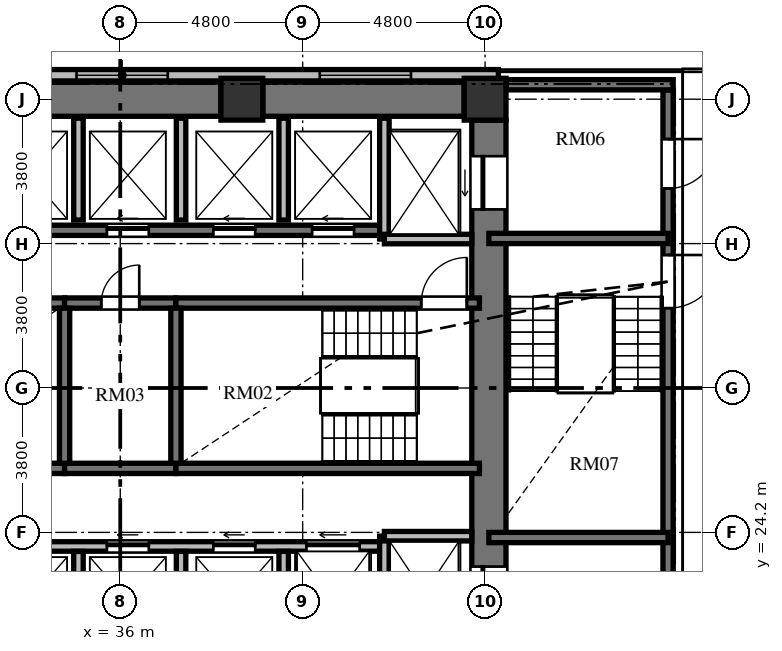
"""IFC4 building model, lengths in metres.
Left out: names, types, materials, properties, quantities, classifications, styles, units other than length and angle.
Written with IfcOpenShell. Run it as: python <this file> out.ifc"""

import sys

from ifc_helpers import new_model, si_unit, direction, frame, frame_2d, origin, origin_2d, place, context, subcontext, project, spatial, rectangle, extrude, element, fill, save


model = new_model("IFC4")
c1 = context("Model", 3, precision=1e-05, world=origin(), true_north=direction((0.0, 1.0)))
c2 = subcontext(c1, "Body", "Model", "MODEL_VIEW")
j1 = project(units=[si_unit("LENGTHUNIT", "METRE"), si_unit("PLANEANGLEUNIT", "RADIAN")], contexts=[c1])
p1 = place(None, origin())
s1 = spatial("IfcSite", under=j1, at=p1, CompositionType="ELEMENT")
p2 = place(p1, origin())
s2 = spatial("IfcBuilding", under=s1, at=p2, CompositionType="ELEMENT")
p3 = place(p2, origin())
s3 = spatial("IfcBuildingStorey", under=s2, at=p3, CompositionType="ELEMENT", Elevation=0.0)
for number, where, z_axis, x_axis in (
    (1, (45.6, 35.6, 0.0), (0.0, 0.0, 1.0), (1.0, 0.0, 0.0)),
    (2, (39.2, 35.6, 0.0), (0.0, 0.0, 1.0), (1.0, 0.0, 0.0)),
):
    element("IfcColumn", number, at=place(p3, frame(where, z_axis=z_axis, x_axis=x_axis)), inside=s3, PredefinedType="COLUMN", context=c2, shape_type="SweptSolid", body=[
        extrude(rectangle(XDim=1.1, YDim=1.1, at=origin_2d()), origin(), (0.0, 0.0, 1.0), 6.0),
    ])
p4 = place(p3, frame((45.7, 20.95, 0.0), z_axis=(0.0, 0.0, 1.0), x_axis=(0.0, 1.0, 0.0)))
e3 = element("IfcWall", 3, at=p4, inside=s3, PredefinedType="SHEAR", context=c2, shape_type="SweptSolid", body=[
    extrude(rectangle(XDim=14.1, YDim=0.9, at=frame_2d((7.05, 0.0))), origin(), (0.0, 0.0, 1.0), 6.0),
])
p5 = place(p4, frame((11.75, 0.0, 0.0)))
e4 = element("IfcOpeningElement", 4, at=p5, cuts=e3, PredefinedType="OPENING", context=c2, shape_type="SweptSolid", body=[
    extrude(rectangle(XDim=1.4, YDim=2.3, at=frame_2d((0.7, 1.15))), frame((0.0, 0.46, 0.0), z_axis=(0.0, -1.0, 0.0), x_axis=(1.0, 0.0, 0.0)), (0.0, 0.0, 1.0), 0.92),
])
p6 = place(p4, frame((0.95, 0.0, 0.0)))
e5 = element("IfcOpeningElement", 5, at=p6, cuts=e3, PredefinedType="OPENING", context=c2, shape_type="SweptSolid", body=[
    extrude(rectangle(XDim=1.4, YDim=2.3, at=frame_2d((0.7, 1.15))), frame((0.0, 0.46, 0.0), z_axis=(0.0, -1.0, 0.0), x_axis=(1.0, 0.0, 0.0)), (0.0, 0.0, 1.0), 0.92),
])
p7 = place(p3, frame((33.35, 35.6, 0.0), z_axis=(0.0, 0.0, 1.0), x_axis=(1.0, 0.0, 0.0)))
e6 = element("IfcWall", 6, at=p7, inside=s3, PredefinedType="SHEAR", context=c2, shape_type="SweptSolid", body=[
    extrude(rectangle(XDim=5.3, YDim=0.9, at=frame_2d((2.65, 0.0))), origin(), (0.0, 0.0, 1.0), 6.0),
])
p8 = place(p3, frame((39.75, 35.6, 0.0), z_axis=(0.0, 0.0, 1.0), x_axis=(1.0, 0.0, 0.0)))
e7 = element("IfcWall", 7, at=p8, inside=s3, PredefinedType="SHEAR", context=c2, shape_type="SweptSolid", body=[
    extrude(rectangle(XDim=5.3, YDim=0.9, at=frame_2d((2.65, 0.0))), origin(), (0.0, 0.0, 1.0), 6.0),
])
p9 = place(p3, frame((24.0, 36.23, 0.0), z_axis=(0.0, 0.0, 1.0), x_axis=(1.0, 0.0, 0.0)))
e8 = element("IfcWall", 8, at=p9, inside=s3, PredefinedType="SOLIDWALL", context=c2, shape_type="SweptSolid", body=[
    extrude(rectangle(XDim=21.95, YDim=0.3, at=frame_2d((10.975, 0.0))), origin(), (0.0, 0.0, 1.0), 5.72),
])
p10 = place(p9, frame((4.45, 0.0, 0.9)))
e9 = element("IfcOpeningElement", 9, at=p10, cuts=e8, PredefinedType="OPENING", context=c2, shape_type="SweptSolid", body=[
    extrude(rectangle(XDim=2.4, YDim=3.0, at=frame_2d((1.2, 1.5))), frame((0.0, 0.16, 0.0), z_axis=(0.0, -1.0, 0.0), x_axis=(1.0, 0.0, 0.0)), (0.0, 0.0, 1.0), 0.32),
])
p11 = place(p9, frame((10.85, 0.0, 0.9)))
e10 = element("IfcOpeningElement", 10, at=p11, cuts=e8, PredefinedType="OPENING", context=c2, shape_type="SweptSolid", body=[
    extrude(rectangle(XDim=2.4, YDim=3.0, at=frame_2d((1.2, 1.5))), frame((0.0, 0.16, 0.0), z_axis=(0.0, -1.0, 0.0), x_axis=(1.0, 0.0, 0.0)), (0.0, 0.0, 1.0), 0.32),
])
p12 = place(p9, frame((17.25, 0.0, 0.9)))
e11 = element("IfcOpeningElement", 11, at=p12, cuts=e8, PredefinedType="OPENING", context=c2, shape_type="SweptSolid", body=[
    extrude(rectangle(XDim=2.4, YDim=3.0, at=frame_2d((1.2, 1.5))), frame((0.0, 0.16, 0.0), z_axis=(0.0, -1.0, 0.0), x_axis=(1.0, 0.0, 0.0)), (0.0, 0.0, 1.0), 0.32),
])
p13 = place(p3, frame((26.55, 30.235, 0.0), z_axis=(0.0, 0.0, 1.0), x_axis=(1.0, 0.0, 0.0)))
e12 = element("IfcWall", 12, at=p13, inside=s3, PredefinedType="SHEAR", context=c2, shape_type="SweptSolid", body=[
    extrude(rectangle(XDim=7.985, YDim=0.27, at=frame_2d((3.992, 0.0))), origin(), (0.0, 0.0, 1.0), 6.0),
])
p14 = place(p3, frame((34.535, 30.235, 0.0), z_axis=(0.0, 0.0, 1.0), x_axis=(1.0, 0.0, 0.0)))
e13 = element("IfcWall", 13, at=p14, inside=s3, PredefinedType="SHEAR", context=c2, shape_type="SweptSolid", body=[
    extrude(rectangle(XDim=2.93, YDim=0.27, at=frame_2d((1.465, 0.0))), origin(), (0.0, 0.0, 1.0), 6.0),
])
p15 = place(p14, frame((0.965, 0.0, 0.0)))
e14 = element("IfcOpeningElement", 14, at=p15, cuts=e13, PredefinedType="OPENING", context=c2, shape_type="SweptSolid", body=[
    extrude(rectangle(XDim=1.0, YDim=2.1, at=frame_2d((0.5, 1.05))), frame((0.0, 0.145, 0.0), z_axis=(0.0, -1.0, 0.0), x_axis=(1.0, 0.0, 0.0)), (0.0, 0.0, 1.0), 0.29),
])
p16 = place(p3, frame((37.465, 30.235, 0.0), z_axis=(0.0, 0.0, 1.0), x_axis=(1.0, 0.0, 0.0)))
e15 = element("IfcWall", 15, at=p16, inside=s3, PredefinedType="SHEAR", context=c2, shape_type="SweptSolid", body=[
    extrude(rectangle(XDim=7.985, YDim=0.27, at=frame_2d((3.992, 0.0))), origin(), (0.0, 0.0, 1.0), 6.0),
])
p17 = place(p16, frame((6.455, 0.0, 0.0)))
e16 = element("IfcOpeningElement", 16, at=p17, cuts=e15, PredefinedType="OPENING", context=c2, shape_type="SweptSolid", body=[
    extrude(rectangle(XDim=1.2, YDim=2.15, at=frame_2d((0.6, 1.075))), frame((0.0, 0.145, 0.0), z_axis=(0.0, -1.0, 0.0), x_axis=(1.0, 0.0, 0.0)), (0.0, 0.0, 1.0), 0.29),
])
p18 = place(p3, frame((26.55, 25.885, 0.0), z_axis=(0.0, 0.0, 1.0), x_axis=(1.0, 0.0, 0.0)))
e17 = element("IfcWall", 17, at=p18, inside=s3, PredefinedType="SHEAR", context=c2, shape_type="SweptSolid", body=[
    extrude(rectangle(XDim=7.985, YDim=0.27, at=frame_2d((3.992, 0.0))), origin(), (0.0, 0.0, 1.0), 6.0),
])
p19 = place(p3, frame((34.535, 25.885, 0.0), z_axis=(0.0, 0.0, 1.0), x_axis=(1.0, 0.0, 0.0)))
e18 = element("IfcWall", 18, at=p19, inside=s3, PredefinedType="SHEAR", context=c2, shape_type="SweptSolid", body=[
    extrude(rectangle(XDim=2.93, YDim=0.27, at=frame_2d((1.465, 0.0))), origin(), (0.0, 0.0, 1.0), 6.0),
])
p20 = place(p3, frame((37.465, 25.885, 0.0), z_axis=(0.0, 0.0, 1.0), x_axis=(1.0, 0.0, 0.0)))
e19 = element("IfcWall", 19, at=p20, inside=s3, PredefinedType="SHEAR", context=c2, shape_type="SweptSolid", body=[
    extrude(rectangle(XDim=7.985, YDim=0.27, at=frame_2d((3.992, 0.0))), origin(), (0.0, 0.0, 1.0), 6.0),
])
for number, where, z_axis, x_axis in (
    (20, (34.535, 26.02, 0.0), (0.0, 0.0, 1.0), (0.0, 1.0, 0.0)),
    (21, (37.465, 26.02, 0.0), (0.0, 0.0, 1.0), (0.0, 1.0, 0.0)),
):
    element("IfcWall", number, at=place(p3, frame(where, z_axis=z_axis, x_axis=x_axis)), inside=s3, PredefinedType="SHEAR", context=c2, shape_type="SweptSolid", body=[
        extrude(rectangle(XDim=4.08, YDim=0.27, at=frame_2d((2.04, 0.0))), origin(), (0.0, 0.0, 1.0), 6.0),
    ])
p21 = place(p3, frame((26.55, 32.15, 0.0), z_axis=(0.0, 0.0, 1.0), x_axis=(1.0, 0.0, 0.0)))
e22 = element("IfcWall", 22, at=p21, inside=s3, PredefinedType="SHEAR", context=c2, shape_type="SweptSolid", body=[
    extrude(rectangle(XDim=16.4, YDim=0.27, at=frame_2d((8.2, 0.0))), origin(), (0.0, 0.0, 1.0), 6.0),
])
p22 = place(p21, frame((1.1, 0.0, 0.0)))
e23 = element("IfcOpeningElement", 23, at=p22, cuts=e22, PredefinedType="OPENING", context=c2, shape_type="SweptSolid", body=[
    extrude(rectangle(XDim=1.1, YDim=2.2, at=frame_2d((0.55, 1.1))), frame((0.0, 0.145, 0.0), z_axis=(0.0, -1.0, 0.0), x_axis=(1.0, 0.0, 0.0)), (0.0, 0.0, 1.0), 0.29),
])
p23 = place(p21, frame((3.7, 0.0, 0.0)))
e24 = element("IfcOpeningElement", 24, at=p23, cuts=e22, PredefinedType="OPENING", context=c2, shape_type="SweptSolid", body=[
    extrude(rectangle(XDim=1.1, YDim=2.2, at=frame_2d((0.55, 1.1))), frame((0.0, 0.145, 0.0), z_axis=(0.0, -1.0, 0.0), x_axis=(1.0, 0.0, 0.0)), (0.0, 0.0, 1.0), 0.29),
])
p24 = place(p21, frame((6.5, 0.0, 0.0)))
e25 = element("IfcOpeningElement", 25, at=p24, cuts=e22, PredefinedType="OPENING", context=c2, shape_type="SweptSolid", body=[
    extrude(rectangle(XDim=1.1, YDim=2.2, at=frame_2d((0.55, 1.1))), frame((0.0, 0.145, 0.0), z_axis=(0.0, -1.0, 0.0), x_axis=(1.0, 0.0, 0.0)), (0.0, 0.0, 1.0), 0.29),
])
p25 = place(p21, frame((9.1, 0.0, 0.0)))
e26 = element("IfcOpeningElement", 26, at=p25, cuts=e22, PredefinedType="OPENING", context=c2, shape_type="SweptSolid", body=[
    extrude(rectangle(XDim=1.1, YDim=2.2, at=frame_2d((0.55, 1.1))), frame((0.0, 0.145, 0.0), z_axis=(0.0, -1.0, 0.0), x_axis=(1.0, 0.0, 0.0)), (0.0, 0.0, 1.0), 0.29),
])
p26 = place(p21, frame((11.9, 0.0, 0.0)))
e27 = element("IfcOpeningElement", 27, at=p26, cuts=e22, PredefinedType="OPENING", context=c2, shape_type="SweptSolid", body=[
    extrude(rectangle(XDim=1.1, YDim=2.2, at=frame_2d((0.55, 1.1))), frame((0.0, 0.145, 0.0), z_axis=(0.0, -1.0, 0.0), x_axis=(1.0, 0.0, 0.0)), (0.0, 0.0, 1.0), 0.29),
])
p27 = place(p21, frame((14.5, 0.0, 0.0)))
e28 = element("IfcOpeningElement", 28, at=p27, cuts=e22, PredefinedType="OPENING", context=c2, shape_type="SweptSolid", body=[
    extrude(rectangle(XDim=1.1, YDim=2.2, at=frame_2d((0.55, 1.1))), frame((0.0, 0.145, 0.0), z_axis=(0.0, -1.0, 0.0), x_axis=(1.0, 0.0, 0.0)), (0.0, 0.0, 1.0), 0.29),
])
p28 = place(p3, frame((26.75, 23.83, 0.0), z_axis=(0.0, 0.0, 1.0), x_axis=(1.0, 0.0, 0.0)))
e29 = element("IfcWall", 29, at=p28, inside=s3, PredefinedType="SOLIDWALL", context=c2, shape_type="SweptSolid", body=[
    extrude(rectangle(XDim=16.2, YDim=0.25, at=frame_2d((8.1, 0.0))), origin(), (0.0, 0.0, 1.0), 5.72),
])
p29 = place(p28, frame((0.9, 0.0, 0.0)))
e30 = element("IfcOpeningElement", 30, at=p29, cuts=e29, PredefinedType="OPENING", context=c2, shape_type="SweptSolid", body=[
    extrude(rectangle(XDim=1.1, YDim=2.2, at=frame_2d((0.55, 1.1))), frame((0.0, 0.135, 0.0), z_axis=(0.0, -1.0, 0.0), x_axis=(1.0, 0.0, 0.0)), (0.0, 0.0, 1.0), 0.27),
])
p30 = place(p28, frame((3.5, 0.0, 0.0)))
e31 = element("IfcOpeningElement", 31, at=p30, cuts=e29, PredefinedType="OPENING", context=c2, shape_type="SweptSolid", body=[
    extrude(rectangle(XDim=1.1, YDim=2.2, at=frame_2d((0.55, 1.1))), frame((0.0, 0.135, 0.0), z_axis=(0.0, -1.0, 0.0), x_axis=(1.0, 0.0, 0.0)), (0.0, 0.0, 1.0), 0.27),
])
p31 = place(p28, frame((6.3, 0.0, 0.0)))
e32 = element("IfcOpeningElement", 32, at=p31, cuts=e29, PredefinedType="OPENING", context=c2, shape_type="SweptSolid", body=[
    extrude(rectangle(XDim=1.1, YDim=2.2, at=frame_2d((0.55, 1.1))), frame((0.0, 0.135, 0.0), z_axis=(0.0, -1.0, 0.0), x_axis=(1.0, 0.0, 0.0)), (0.0, 0.0, 1.0), 0.27),
])
p32 = place(p28, frame((8.9, 0.0, 0.0)))
e33 = element("IfcOpeningElement", 33, at=p32, cuts=e29, PredefinedType="OPENING", context=c2, shape_type="SweptSolid", body=[
    extrude(rectangle(XDim=1.1, YDim=2.2, at=frame_2d((0.55, 1.1))), frame((0.0, 0.135, 0.0), z_axis=(0.0, -1.0, 0.0), x_axis=(1.0, 0.0, 0.0)), (0.0, 0.0, 1.0), 0.27),
])
p33 = place(p28, frame((11.7, 0.0, 0.0)))
e34 = element("IfcOpeningElement", 34, at=p33, cuts=e29, PredefinedType="OPENING", context=c2, shape_type="SweptSolid", body=[
    extrude(rectangle(XDim=1.1, YDim=2.2, at=frame_2d((0.55, 1.1))), frame((0.0, 0.135, 0.0), z_axis=(0.0, -1.0, 0.0), x_axis=(1.0, 0.0, 0.0)), (0.0, 0.0, 1.0), 0.27),
])
p34 = place(p28, frame((14.15, 0.0, 0.0)))
e35 = element("IfcOpeningElement", 35, at=p34, cuts=e29, PredefinedType="OPENING", context=c2, shape_type="SweptSolid", body=[
    extrude(rectangle(XDim=1.4, YDim=2.3, at=frame_2d((0.7, 1.15))), frame((0.0, 0.135, 0.0), z_axis=(0.0, -1.0, 0.0), x_axis=(1.0, 0.0, 0.0)), (0.0, 0.0, 1.0), 0.27),
])
p35 = place(p3, frame((42.95, 31.92, 0.0), z_axis=(0.0, 0.0, 1.0), x_axis=(0.0, 1.0, 0.0)))
e36 = element("IfcWall", 36, at=p35, inside=s3, PredefinedType="SOLIDWALL", context=c2, shape_type="SweptSolid", body=[
    extrude(rectangle(XDim=3.18, YDim=0.25, at=frame_2d((1.59, 0.0))), origin(), (0.0, 0.0, 1.0), 5.72),
])
p36 = place(p3, frame((42.95, 31.92, 0.0), z_axis=(0.0, 0.0, 1.0), x_axis=(1.0, 0.0, 0.0)))
e37 = element("IfcWall", 37, at=p36, inside=s3, PredefinedType="SOLIDWALL", context=c2, shape_type="SweptSolid", body=[
    extrude(rectangle(XDim=2.3, YDim=0.25, at=frame_2d((1.15, 0.0))), origin(), (0.0, 0.0, 1.0), 5.72),
])
p37 = place(p3, frame((42.95, 20.9, 0.0), z_axis=(0.0, 0.0, 1.0), x_axis=(0.0, 1.0, 0.0)))
e38 = element("IfcWall", 38, at=p37, inside=s3, PredefinedType="SOLIDWALL", context=c2, shape_type="SweptSolid", body=[
    extrude(rectangle(XDim=3.2, YDim=0.25, at=frame_2d((1.6, 0.0))), origin(), (0.0, 0.0, 1.0), 5.72),
])
p38 = place(p3, frame((42.95, 24.1, 0.0), z_axis=(0.0, 0.0, 1.0), x_axis=(1.0, 0.0, 0.0)))
e39 = element("IfcWall", 39, at=p38, inside=s3, PredefinedType="SOLIDWALL", context=c2, shape_type="SweptSolid", body=[
    extrude(rectangle(XDim=2.3, YDim=0.25, at=frame_2d((1.15, 0.0))), origin(), (0.0, 0.0, 1.0), 5.72),
])
p39 = place(p3, frame((34.9, 32.42, 0.0), z_axis=(0.0, 0.0, 1.0), x_axis=(0.0, 1.0, 0.0)))
e40 = element("IfcWall", 40, at=p39, inside=s3, PredefinedType="SOLIDWALL", context=c2, shape_type="SweptSolid", body=[
    extrude(rectangle(XDim=2.68, YDim=0.25, at=frame_2d((1.34, 0.0))), origin(), (0.0, 0.0, 1.0), 5.72),
])
p40 = place(p3, frame((34.9, 20.9, 0.0), z_axis=(0.0, 0.0, 1.0), x_axis=(0.0, 1.0, 0.0)))
e41 = element("IfcWall", 41, at=p40, inside=s3, PredefinedType="SOLIDWALL", context=c2, shape_type="SweptSolid", body=[
    extrude(rectangle(XDim=2.8, YDim=0.25, at=frame_2d((1.4, 0.0))), origin(), (0.0, 0.0, 1.0), 5.72),
])
p41 = place(p3, frame((37.6, 32.42, 0.0), z_axis=(0.0, 0.0, 1.0), x_axis=(0.0, 1.0, 0.0)))
e42 = element("IfcWall", 42, at=p41, inside=s3, PredefinedType="SOLIDWALL", context=c2, shape_type="SweptSolid", body=[
    extrude(rectangle(XDim=2.68, YDim=0.25, at=frame_2d((1.34, 0.0))), origin(), (0.0, 0.0, 1.0), 5.72),
])
p42 = place(p3, frame((37.6, 20.9, 0.0), z_axis=(0.0, 0.0, 1.0), x_axis=(0.0, 1.0, 0.0)))
e43 = element("IfcWall", 43, at=p42, inside=s3, PredefinedType="SOLIDWALL", context=c2, shape_type="SweptSolid", body=[
    extrude(rectangle(XDim=2.8, YDim=0.25, at=frame_2d((1.4, 0.0))), origin(), (0.0, 0.0, 1.0), 5.72),
])
p43 = place(p3, frame((40.3, 32.42, 0.0), z_axis=(0.0, 0.0, 1.0), x_axis=(0.0, 1.0, 0.0)))
e44 = element("IfcWall", 44, at=p43, inside=s3, PredefinedType="SOLIDWALL", context=c2, shape_type="SweptSolid", body=[
    extrude(rectangle(XDim=2.68, YDim=0.25, at=frame_2d((1.34, 0.0))), origin(), (0.0, 0.0, 1.0), 5.72),
])
p44 = place(p3, frame((40.3, 20.9, 0.0), z_axis=(0.0, 0.0, 1.0), x_axis=(0.0, 1.0, 0.0)))
e45 = element("IfcWall", 45, at=p44, inside=s3, PredefinedType="SOLIDWALL", context=c2, shape_type="SweptSolid", body=[
    extrude(rectangle(XDim=2.8, YDim=0.25, at=frame_2d((1.4, 0.0))), origin(), (0.0, 0.0, 1.0), 5.72),
])
p45 = place(p3, frame((50.415, 35.845, 0.0), z_axis=(0.0, 0.0, 1.0), x_axis=(0.0, -1.0, 0.0)))
e46 = element("IfcWall", 46, at=p45, inside=s3, PredefinedType="SHEAR", context=c2, shape_type="SweptSolid", body=[
    extrude(rectangle(XDim=15.825, YDim=0.27, at=frame_2d((7.913, 0.0))), origin(), (0.0, 0.0, 1.0), 6.0),
])
p46 = place(p45, frame((4.345, 0.0, 0.0)))
e47 = element("IfcOpeningElement", 47, at=p46, cuts=e46, PredefinedType="OPENING", context=c2, shape_type="SweptSolid", body=[
    extrude(rectangle(XDim=1.4, YDim=2.25, at=frame_2d((0.7, 1.125))), frame((0.0, 0.145, 0.0), z_axis=(0.0, -1.0, 0.0), x_axis=(1.0, 0.0, 0.0)), (0.0, 0.0, 1.0), 0.29),
])
p47 = place(p45, frame((1.295, 0.0, 0.0)))
e48 = element("IfcOpeningElement", 48, at=p47, cuts=e46, PredefinedType="OPENING", context=c2, shape_type="SweptSolid", body=[
    extrude(rectangle(XDim=1.3, YDim=2.2, at=frame_2d((0.65, 1.1))), frame((0.0, 0.145, 0.0), z_axis=(0.0, -1.0, 0.0), x_axis=(1.0, 0.0, 0.0)), (0.0, 0.0, 1.0), 0.29),
])
p48 = place(p45, frame((13.095, 0.0, 0.0)))
e49 = element("IfcOpeningElement", 49, at=p48, cuts=e46, PredefinedType="OPENING", context=c2, shape_type="SweptSolid", body=[
    extrude(rectangle(XDim=1.3, YDim=2.2, at=frame_2d((0.65, 1.1))), frame((0.0, 0.145, 0.0), z_axis=(0.0, -1.0, 0.0), x_axis=(1.0, 0.0, 0.0)), (0.0, 0.0, 1.0), 0.29),
])
p49 = place(p3, frame((46.15, 35.98, 0.0), z_axis=(0.0, 0.0, 1.0), x_axis=(1.0, 0.0, 0.0)))
e50 = element("IfcWall", 50, at=p49, inside=s3, PredefinedType="SHEAR", context=c2, shape_type="SweptSolid", body=[
    extrude(rectangle(XDim=4.4, YDim=0.27, at=frame_2d((2.2, 0.0))), origin(), (0.0, 0.0, 1.0), 6.0),
])
for number, where, z_axis, x_axis in (
    (51, (45.7, 31.935, 0.0), (0.0, 0.0, 1.0), (1.0, 0.0, 0.0)),
    (52, (45.7, 24.065, 0.0), (0.0, 0.0, 1.0), (1.0, 0.0, 0.0)),
):
    element("IfcWall", number, at=place(p3, frame(where, z_axis=z_axis, x_axis=x_axis)), inside=s3, PredefinedType="SHEAR", context=c2, shape_type="SweptSolid", body=[
        extrude(rectangle(XDim=4.715, YDim=0.27, at=frame_2d((2.357, 0.0))), origin(), (0.0, 0.0, 1.0), 6.0),
    ])
p50 = place(p11, origin())
e53 = element("IfcWindow", 53, at=p50, inside=s3, PartitioningType="SINGLE_PANEL", PredefinedType="WINDOW", context=c2, shape_type="SweptSolid", body=[
    extrude(rectangle(XDim=2.4, YDim=3.0, at=frame_2d((1.2, 1.5))), frame((0.0, 0.03, 0.0), z_axis=(0.0, -1.0, 0.0), x_axis=(1.0, 0.0, 0.0)), (0.0, 0.0, 1.0), 0.06),
])
fill(e10, e53)
p51 = place(p12, origin())
e54 = element("IfcWindow", 54, at=p51, inside=s3, PartitioningType="SINGLE_PANEL", PredefinedType="WINDOW", context=c2, shape_type="SweptSolid", body=[
    extrude(rectangle(XDim=2.4, YDim=3.0, at=frame_2d((1.2, 1.5))), frame((0.0, 0.03, 0.0), z_axis=(0.0, -1.0, 0.0), x_axis=(1.0, 0.0, 0.0)), (0.0, 0.0, 1.0), 0.06),
])
fill(e11, e54)
p52 = place(p17, origin())
e55 = element("IfcDoor", 55, at=p52, inside=s3, OperationType="SINGLE_SWING_RIGHT", PredefinedType="DOOR", context=c2, shape_type="SweptSolid", body=[
    extrude(rectangle(XDim=1.2, YDim=2.15, at=frame_2d((0.6, 1.075))), frame((0.0, 0.025, 0.0), z_axis=(0.0, -1.0, 0.0), x_axis=(1.0, 0.0, 0.0)), (0.0, 0.0, 1.0), 0.05),
])
fill(e16, e55)
p53 = place(p15, origin())
e56 = element("IfcDoor", 56, at=p53, inside=s3, OperationType="SINGLE_SWING_RIGHT", PredefinedType="DOOR", context=c2, shape_type="SweptSolid", body=[
    extrude(rectangle(XDim=1.0, YDim=2.1, at=frame_2d((0.5, 1.05))), frame((0.0, 0.025, 0.0), z_axis=(0.0, -1.0, 0.0), x_axis=(1.0, 0.0, 0.0)), (0.0, 0.0, 1.0), 0.05),
])
fill(e14, e56)
p54 = place(p25, origin())
e57 = element("IfcDoor", 57, at=p54, inside=s3, OperationType="SLIDING_TO_LEFT", PredefinedType="DOOR", context=c2, shape_type="SweptSolid", body=[
    extrude(rectangle(XDim=1.1, YDim=2.2, at=frame_2d((0.55, 1.1))), frame((0.0, 0.025, 0.0), z_axis=(0.0, -1.0, 0.0), x_axis=(1.0, 0.0, 0.0)), (0.0, 0.0, 1.0), 0.05),
])
fill(e26, e57)
p55 = place(p32, origin())
e58 = element("IfcDoor", 58, at=p55, inside=s3, OperationType="SLIDING_TO_LEFT", PredefinedType="DOOR", context=c2, shape_type="SweptSolid", body=[
    extrude(rectangle(XDim=1.1, YDim=2.2, at=frame_2d((0.55, 1.1))), frame((0.0, 0.025, 0.0), z_axis=(0.0, -1.0, 0.0), x_axis=(1.0, 0.0, 0.0)), (0.0, 0.0, 1.0), 0.05),
])
fill(e33, e58)
p56 = place(p26, origin())
e59 = element("IfcDoor", 59, at=p56, inside=s3, OperationType="SLIDING_TO_LEFT", PredefinedType="DOOR", context=c2, shape_type="SweptSolid", body=[
    extrude(rectangle(XDim=1.1, YDim=2.2, at=frame_2d((0.55, 1.1))), frame((0.0, 0.025, 0.0), z_axis=(0.0, -1.0, 0.0), x_axis=(1.0, 0.0, 0.0)), (0.0, 0.0, 1.0), 0.05),
])
fill(e27, e59)
p57 = place(p27, origin())
e60 = element("IfcDoor", 60, at=p57, inside=s3, OperationType="SLIDING_TO_LEFT", PredefinedType="DOOR", context=c2, shape_type="SweptSolid", body=[
    extrude(rectangle(XDim=1.1, YDim=2.2, at=frame_2d((0.55, 1.1))), frame((0.0, 0.025, 0.0), z_axis=(0.0, -1.0, 0.0), x_axis=(1.0, 0.0, 0.0)), (0.0, 0.0, 1.0), 0.05),
])
fill(e28, e60)
p58 = place(p33, origin())
e61 = element("IfcDoor", 61, at=p58, inside=s3, OperationType="SLIDING_TO_LEFT", PredefinedType="DOOR", context=c2, shape_type="SweptSolid", body=[
    extrude(rectangle(XDim=1.1, YDim=2.2, at=frame_2d((0.55, 1.1))), frame((0.0, 0.025, 0.0), z_axis=(0.0, -1.0, 0.0), x_axis=(1.0, 0.0, 0.0)), (0.0, 0.0, 1.0), 0.05),
])
fill(e34, e61)
p59 = place(p5, origin())
e62 = element("IfcDoor", 62, at=p59, inside=s3, OperationType="SLIDING_TO_LEFT", PredefinedType="DOOR", context=c2, shape_type="SweptSolid", body=[
    extrude(rectangle(XDim=1.4, YDim=2.3, at=frame_2d((0.7, 1.15))), frame((0.0, 0.025, 0.0), z_axis=(0.0, -1.0, 0.0), x_axis=(1.0, 0.0, 0.0)), (0.0, 0.0, 1.0), 0.05),
])
fill(e4, e62)
p60 = place(p6, origin())
e63 = element("IfcDoor", 63, at=p60, inside=s3, OperationType="SLIDING_TO_LEFT", PredefinedType="DOOR", context=c2, shape_type="SweptSolid", body=[
    extrude(rectangle(XDim=1.4, YDim=2.3, at=frame_2d((0.7, 1.15))), frame((0.0, 0.025, 0.0), z_axis=(0.0, -1.0, 0.0), x_axis=(1.0, 0.0, 0.0)), (0.0, 0.0, 1.0), 0.05),
])
fill(e5, e63)
p61 = place(p34, origin())
e64 = element("IfcDoor", 64, at=p61, inside=s3, OperationType="SLIDING_TO_LEFT", PredefinedType="DOOR", context=c2, shape_type="SweptSolid", body=[
    extrude(rectangle(XDim=1.4, YDim=2.3, at=frame_2d((0.7, 1.15))), frame((0.0, 0.025, 0.0), z_axis=(0.0, -1.0, 0.0), x_axis=(1.0, 0.0, 0.0)), (0.0, 0.0, 1.0), 0.05),
])
fill(e35, e64)
p62 = place(p46, origin())
e65 = element("IfcDoor", 65, at=p62, inside=s3, OperationType="SINGLE_SWING_LEFT", PredefinedType="DOOR", context=c2, shape_type="SweptSolid", body=[
    extrude(rectangle(XDim=1.4, YDim=2.25, at=frame_2d((0.7, 1.125))), frame((0.0, 0.025, 0.0), z_axis=(0.0, -1.0, 0.0), x_axis=(1.0, 0.0, 0.0)), (0.0, 0.0, 1.0), 0.05),
])
fill(e47, e65)
p63 = place(p47, origin())
e66 = element("IfcDoor", 66, at=p63, inside=s3, OperationType="SINGLE_SWING_LEFT", PredefinedType="DOOR", context=c2, shape_type="SweptSolid", body=[
    extrude(rectangle(XDim=1.3, YDim=2.2, at=frame_2d((0.65, 1.1))), frame((0.0, 0.025, 0.0), z_axis=(0.0, -1.0, 0.0), x_axis=(1.0, 0.0, 0.0)), (0.0, 0.0, 1.0), 0.05),
])
fill(e48, e66)
save(model, sys.argv[1])
